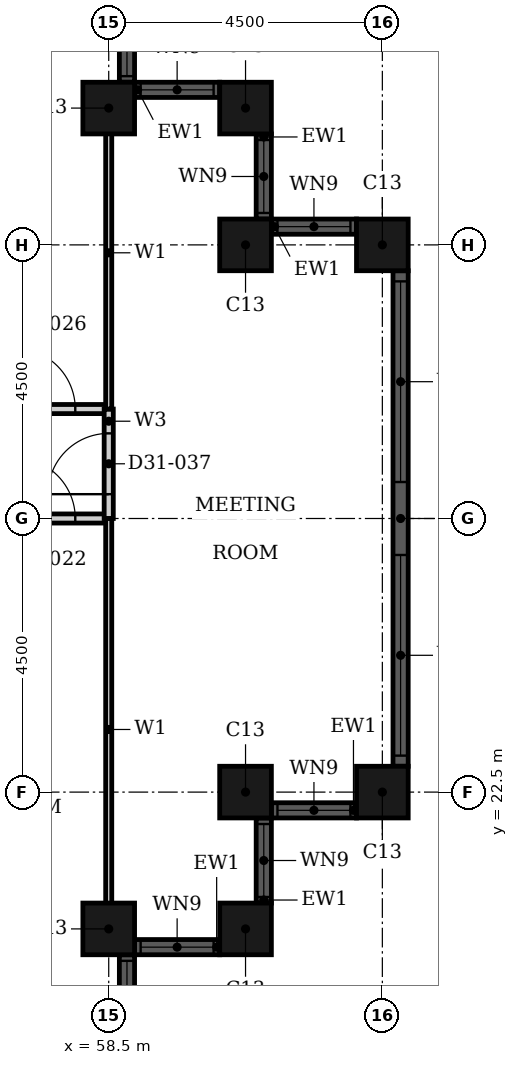
"""IFC4 building model, lengths in metres.
Left out: names, types, materials, properties, quantities, classifications, styles, units other than length and angle.
Written with IfcOpenShell. Run it as: python <this file> out.ifc"""

import sys

from ifc_helpers import new_model, si_unit, direction, frame, frame_2d, origin, origin_2d, place, context, subcontext, project, spatial, rectangle, hollow_rectangle, extrude, element, fill, save


model = new_model("IFC4")
c1 = context("Model", 3, precision=1e-05, world=origin(), true_north=direction((0.0, 1.0)))
c2 = subcontext(c1, "Body", "Model", "MODEL_VIEW")
j1 = project(units=[si_unit("LENGTHUNIT", "METRE"), si_unit("PLANEANGLEUNIT", "RADIAN")], contexts=[c1])
p1 = place(None, origin())
s1 = spatial("IfcSite", under=j1, at=p1, CompositionType="ELEMENT")
p2 = place(p1, origin())
s2 = spatial("IfcBuilding", under=s1, at=p2, CompositionType="ELEMENT")
p3 = place(p2, frame((0.0, 0.0, 126.0)))
s3 = spatial("IfcBuildingStorey", under=s2, at=p3, CompositionType="ELEMENT", Elevation=126.0)
for number, where, z_axis, x_axis in (
    (1, (58.5, 20.25, 0.0), (0.0, 0.0, 1.0), (1.0, 0.0, 0.0)),
    (2, (60.75, 20.25, 0.0), (0.0, 0.0, 1.0), (1.0, 0.0, 0.0)),
    (3, (60.75, 22.5, 0.0), (0.0, 0.0, 1.0), (1.0, 0.0, 0.0)),
    (4, (63.0, 22.5, 0.0), (0.0, 0.0, 1.0), (1.0, 0.0, 0.0)),
    (5, (63.0, 31.5, 0.0), (0.0, 0.0, 1.0), (1.0, 0.0, 0.0)),
    (6, (60.75, 31.5, 0.0), (0.0, 0.0, 1.0), (1.0, 0.0, 0.0)),
    (7, (60.75, 33.75, 0.0), (0.0, 0.0, 1.0), (1.0, 0.0, 0.0)),
    (8, (58.5, 33.75, 0.0), (0.0, 0.0, 1.0), (1.0, 0.0, 0.0)),
):
    element("IfcColumn", number, at=place(p3, frame(where, z_axis=z_axis, x_axis=x_axis)), inside=s3, PredefinedType="COLUMN", context=c2, shape_type="SweptSolid", body=[
        extrude(hollow_rectangle(XDim=0.85, YDim=0.85, WallThickness=0.026, at=origin_2d()), origin(), (0.0, 0.0, 1.0), 3.6),
    ])
p4 = place(p3, frame((58.8, 18.425, 0.0), z_axis=(0.0, 0.0, 1.0), x_axis=(0.0, 1.0, 0.0)))
e9 = element("IfcWall", 9, at=p4, inside=s3, PredefinedType="SOLIDWALL", context=c2, shape_type="SweptSolid", body=[
    extrude(rectangle(XDim=1.4, YDim=0.25, at=frame_2d((0.7, 0.0))), origin(), (0.0, 0.0, 1.0), 3.6),
])
p5 = place(p4, frame((0.1, 0.0, 0.9)))
e10 = element("IfcOpeningElement", 10, at=p5, cuts=e9, PredefinedType="OPENING", context=c2, shape_type="SweptSolid", body=[
    extrude(rectangle(XDim=1.2, YDim=2.08, at=frame_2d((0.6, 1.04))), frame((0.0, 0.135, 0.0), z_axis=(0.0, -1.0, 0.0), x_axis=(1.0, 0.0, 0.0)), (0.0, 0.0, 1.0), 0.27),
])
p6 = place(p3, frame((58.925, 19.95, 0.0), z_axis=(0.0, 0.0, 1.0), x_axis=(1.0, 0.0, 0.0)))
e11 = element("IfcWall", 11, at=p6, inside=s3, PredefinedType="SOLIDWALL", context=c2, shape_type="SweptSolid", body=[
    extrude(rectangle(XDim=1.4, YDim=0.25, at=frame_2d((0.7, 0.0))), origin(), (0.0, 0.0, 1.0), 3.6),
])
p7 = place(p6, frame((0.1, 0.0, 0.9)))
e12 = element("IfcOpeningElement", 12, at=p7, cuts=e11, PredefinedType="OPENING", context=c2, shape_type="SweptSolid", body=[
    extrude(rectangle(XDim=1.2, YDim=2.08, at=frame_2d((0.6, 1.04))), frame((0.0, 0.135, 0.0), z_axis=(0.0, -1.0, 0.0), x_axis=(1.0, 0.0, 0.0)), (0.0, 0.0, 1.0), 0.27),
])
p8 = place(p3, frame((61.05, 20.675, 0.0), z_axis=(0.0, 0.0, 1.0), x_axis=(0.0, 1.0, 0.0)))
e13 = element("IfcWall", 13, at=p8, inside=s3, PredefinedType="SOLIDWALL", context=c2, shape_type="SweptSolid", body=[
    extrude(rectangle(XDim=1.4, YDim=0.25, at=frame_2d((0.7, 0.0))), origin(), (0.0, 0.0, 1.0), 3.6),
])
p9 = place(p8, frame((0.1, 0.0, 0.9)))
e14 = element("IfcOpeningElement", 14, at=p9, cuts=e13, PredefinedType="OPENING", context=c2, shape_type="SweptSolid", body=[
    extrude(rectangle(XDim=1.2, YDim=2.08, at=frame_2d((0.6, 1.04))), frame((0.0, 0.135, 0.0), z_axis=(0.0, -1.0, 0.0), x_axis=(1.0, 0.0, 0.0)), (0.0, 0.0, 1.0), 0.27),
])
p10 = place(p3, frame((61.175, 22.2, 0.0), z_axis=(0.0, 0.0, 1.0), x_axis=(1.0, 0.0, 0.0)))
e15 = element("IfcWall", 15, at=p10, inside=s3, PredefinedType="SOLIDWALL", context=c2, shape_type="SweptSolid", body=[
    extrude(rectangle(XDim=1.4, YDim=0.25, at=frame_2d((0.7, 0.0))), origin(), (0.0, 0.0, 1.0), 3.6),
])
p11 = place(p10, frame((0.1, 0.0, 0.9)))
e16 = element("IfcOpeningElement", 16, at=p11, cuts=e15, PredefinedType="OPENING", context=c2, shape_type="SweptSolid", body=[
    extrude(rectangle(XDim=1.2, YDim=2.08, at=frame_2d((0.6, 1.04))), frame((0.0, 0.135, 0.0), z_axis=(0.0, -1.0, 0.0), x_axis=(1.0, 0.0, 0.0)), (0.0, 0.0, 1.0), 0.27),
])
p12 = place(p3, frame((63.3, 22.925, 0.0), z_axis=(0.0, 0.0, 1.0), x_axis=(0.0, 1.0, 0.0)))
e17 = element("IfcWall", 17, at=p12, inside=s3, PredefinedType="SOLIDWALL", context=c2, shape_type="SweptSolid", body=[
    extrude(rectangle(XDim=8.15, YDim=0.25, at=frame_2d((4.075, 0.0))), origin(), (0.0, 0.0, 1.0), 3.6),
])
p13 = place(p12, frame((0.175, 0.0, 0.9)))
e18 = element("IfcOpeningElement", 18, at=p13, cuts=e17, PredefinedType="OPENING", context=c2, shape_type="SweptSolid", body=[
    extrude(rectangle(XDim=3.3, YDim=2.08, at=frame_2d((1.65, 1.04))), frame((0.0, 0.135, 0.0), z_axis=(0.0, -1.0, 0.0), x_axis=(1.0, 0.0, 0.0)), (0.0, 0.0, 1.0), 0.27),
])
p14 = place(p12, frame((4.675, 0.0, 0.9)))
e19 = element("IfcOpeningElement", 19, at=p14, cuts=e17, PredefinedType="OPENING", context=c2, shape_type="SweptSolid", body=[
    extrude(rectangle(XDim=3.3, YDim=2.08, at=frame_2d((1.65, 1.04))), frame((0.0, 0.135, 0.0), z_axis=(0.0, -1.0, 0.0), x_axis=(1.0, 0.0, 0.0)), (0.0, 0.0, 1.0), 0.27),
])
p15 = place(p3, frame((62.575, 31.8, 0.0), z_axis=(0.0, 0.0, 1.0), x_axis=(-1.0, 0.0, 0.0)))
e20 = element("IfcWall", 20, at=p15, inside=s3, PredefinedType="SOLIDWALL", context=c2, shape_type="SweptSolid", body=[
    extrude(rectangle(XDim=1.4, YDim=0.25, at=frame_2d((0.7, 0.0))), origin(), (0.0, 0.0, 1.0), 3.6),
])
p16 = place(p15, frame((0.1, 0.0, 0.9)))
e21 = element("IfcOpeningElement", 21, at=p16, cuts=e20, PredefinedType="OPENING", context=c2, shape_type="SweptSolid", body=[
    extrude(rectangle(XDim=1.2, YDim=2.08, at=frame_2d((0.6, 1.04))), frame((0.0, 0.135, 0.0), z_axis=(0.0, -1.0, 0.0), x_axis=(1.0, 0.0, 0.0)), (0.0, 0.0, 1.0), 0.27),
])
p17 = place(p3, frame((61.05, 31.925, 0.0), z_axis=(0.0, 0.0, 1.0), x_axis=(0.0, 1.0, 0.0)))
e22 = element("IfcWall", 22, at=p17, inside=s3, PredefinedType="SOLIDWALL", context=c2, shape_type="SweptSolid", body=[
    extrude(rectangle(XDim=1.4, YDim=0.25, at=frame_2d((0.7, 0.0))), origin(), (0.0, 0.0, 1.0), 3.6),
])
p18 = place(p17, frame((0.1, 0.0, 0.9)))
e23 = element("IfcOpeningElement", 23, at=p18, cuts=e22, PredefinedType="OPENING", context=c2, shape_type="SweptSolid", body=[
    extrude(rectangle(XDim=1.2, YDim=2.08, at=frame_2d((0.6, 1.04))), frame((0.0, 0.135, 0.0), z_axis=(0.0, -1.0, 0.0), x_axis=(1.0, 0.0, 0.0)), (0.0, 0.0, 1.0), 0.27),
])
p19 = place(p3, frame((60.325, 34.05, 0.0), z_axis=(0.0, 0.0, 1.0), x_axis=(-1.0, 0.0, 0.0)))
e24 = element("IfcWall", 24, at=p19, inside=s3, PredefinedType="SOLIDWALL", context=c2, shape_type="SweptSolid", body=[
    extrude(rectangle(XDim=1.4, YDim=0.25, at=frame_2d((0.7, 0.0))), origin(), (0.0, 0.0, 1.0), 3.6),
])
p20 = place(p19, frame((0.1, 0.0, 0.9)))
e25 = element("IfcOpeningElement", 25, at=p20, cuts=e24, PredefinedType="OPENING", context=c2, shape_type="SweptSolid", body=[
    extrude(rectangle(XDim=1.2, YDim=2.08, at=frame_2d((0.6, 1.04))), frame((0.0, 0.135, 0.0), z_axis=(0.0, -1.0, 0.0), x_axis=(1.0, 0.0, 0.0)), (0.0, 0.0, 1.0), 0.27),
])
p21 = place(p3, frame((58.8, 34.175, 0.0), z_axis=(0.0, 0.0, 1.0), x_axis=(0.0, 1.0, 0.0)))
e26 = element("IfcWall", 26, at=p21, inside=s3, PredefinedType="SOLIDWALL", context=c2, shape_type="SweptSolid", body=[
    extrude(rectangle(XDim=1.4, YDim=0.25, at=frame_2d((0.7, 0.0))), origin(), (0.0, 0.0, 1.0), 3.6),
])
p22 = place(p21, frame((0.1, 0.0, 0.9)))
e27 = element("IfcOpeningElement", 27, at=p22, cuts=e26, PredefinedType="OPENING", context=c2, shape_type="SweptSolid", body=[
    extrude(rectangle(XDim=1.2, YDim=2.08, at=frame_2d((0.6, 1.04))), frame((0.0, 0.135, 0.0), z_axis=(0.0, -1.0, 0.0), x_axis=(1.0, 0.0, 0.0)), (0.0, 0.0, 1.0), 0.27),
])
p23 = place(p3, frame((46.8, 27.0, 0.0), z_axis=(0.0, 0.0, 1.0), x_axis=(1.0, 0.0, 0.0)))
e28 = element("IfcWall", 28, at=p23, inside=s3, PredefinedType="PARTITIONING", context=c2, shape_type="SweptSolid", body=[
    extrude(rectangle(XDim=11.7, YDim=0.15, at=frame_2d((5.85, 0.0))), origin(), (0.0, 0.0, 1.0), 2.58),
])
p24 = place(p23, frame((5.65, 0.0, 0.0)))
e29 = element("IfcOpeningElement", 29, at=p24, cuts=e28, PredefinedType="OPENING", context=c2, shape_type="SweptSolid", body=[
    extrude(rectangle(XDim=1.0, YDim=2.1, at=frame_2d((0.5, 1.05))), frame((0.0, 0.085, 0.0), z_axis=(0.0, -1.0, 0.0), x_axis=(1.0, 0.0, 0.0)), (0.0, 0.0, 1.0), 0.17),
])
p25 = place(p23, frame((10.15, 0.0, 0.0)))
e30 = element("IfcOpeningElement", 30, at=p25, cuts=e28, PredefinedType="OPENING", context=c2, shape_type="SweptSolid", body=[
    extrude(rectangle(XDim=1.0, YDim=2.1, at=frame_2d((0.5, 1.05))), frame((0.0, 0.085, 0.0), z_axis=(0.0, -1.0, 0.0), x_axis=(1.0, 0.0, 0.0)), (0.0, 0.0, 1.0), 0.17),
])
p26 = place(p3, frame((46.8, 28.8, 0.0), z_axis=(0.0, 0.0, 1.0), x_axis=(1.0, 0.0, 0.0)))
e31 = element("IfcWall", 31, at=p26, inside=s3, PredefinedType="PARTITIONING", context=c2, shape_type="SweptSolid", body=[
    extrude(rectangle(XDim=11.7, YDim=0.15, at=frame_2d((5.85, 0.0))), origin(), (0.0, 0.0, 1.0), 3.3),
])
p27 = place(p26, frame((5.65, 0.0, 0.0)))
e32 = element("IfcOpeningElement", 32, at=p27, cuts=e31, PredefinedType="OPENING", context=c2, shape_type="SweptSolid", body=[
    extrude(rectangle(XDim=1.0, YDim=2.1, at=frame_2d((0.5, 1.05))), frame((0.0, 0.085, 0.0), z_axis=(0.0, -1.0, 0.0), x_axis=(1.0, 0.0, 0.0)), (0.0, 0.0, 1.0), 0.17),
])
p28 = place(p26, frame((10.15, 0.0, 0.0)))
e33 = element("IfcOpeningElement", 33, at=p28, cuts=e31, PredefinedType="OPENING", context=c2, shape_type="SweptSolid", body=[
    extrude(rectangle(XDim=1.0, YDim=2.1, at=frame_2d((0.5, 1.05))), frame((0.0, 0.085, 0.0), z_axis=(0.0, -1.0, 0.0), x_axis=(1.0, 0.0, 0.0)), (0.0, 0.0, 1.0), 0.17),
])
p29 = place(p3, frame((58.5, 27.0, 0.0), z_axis=(0.0, 0.0, 1.0), x_axis=(0.0, 1.0, 0.0)))
e34 = element("IfcWall", 34, at=p29, inside=s3, PredefinedType="PARTITIONING", context=c2, shape_type="SweptSolid", body=[
    extrude(rectangle(XDim=1.8, YDim=0.15, at=frame_2d((0.9, 0.0))), origin(), (0.0, 0.0, 1.0), 3.3),
])
p30 = place(p29, frame((0.4, 0.0, 0.0)))
e35 = element("IfcOpeningElement", 35, at=p30, cuts=e34, PredefinedType="OPENING", context=c2, shape_type="SweptSolid", body=[
    extrude(rectangle(XDim=1.0, YDim=2.1, at=frame_2d((0.5, 1.05))), frame((0.0, 0.085, 0.0), z_axis=(0.0, -1.0, 0.0), x_axis=(1.0, 0.0, 0.0)), (0.0, 0.0, 1.0), 0.17),
])
p31 = place(p3, frame((58.5, 28.8, 0.0), z_axis=(0.0, 0.0, 1.0), x_axis=(0.0, 1.0, 0.0)))
e36 = element("IfcWall", 36, at=p31, inside=s3, PredefinedType="PARTITIONING", context=c2, shape_type="SweptSolid", body=[
    extrude(rectangle(XDim=5.14, YDim=0.1, at=frame_2d((2.57, 0.0))), origin(), (0.0, 0.0, 1.0), 3.3),
])
p32 = place(p3, frame((58.5, 20.06, 0.0), z_axis=(0.0, 0.0, 1.0), x_axis=(0.0, 1.0, 0.0)))
e37 = element("IfcWall", 37, at=p32, inside=s3, PredefinedType="PARTITIONING", context=c2, shape_type="SweptSolid", body=[
    extrude(rectangle(XDim=6.94, YDim=0.1, at=frame_2d((3.47, 0.0))), origin(), (0.0, 0.0, 1.0), 3.3),
])
p33 = place(p5, origin())
e38 = element("IfcWindow", 38, at=p33, inside=s3, PartitioningType="SINGLE_PANEL", PredefinedType="WINDOW", context=c2, shape_type="SweptSolid", body=[
    extrude(rectangle(XDim=1.2, YDim=2.08, at=frame_2d((0.6, 1.04))), frame((0.0, 0.03, 0.0), z_axis=(0.0, -1.0, 0.0), x_axis=(1.0, 0.0, 0.0)), (0.0, 0.0, 1.0), 0.06),
])
fill(e10, e38)
p34 = place(p7, origin())
e39 = element("IfcWindow", 39, at=p34, inside=s3, PartitioningType="SINGLE_PANEL", PredefinedType="WINDOW", context=c2, shape_type="SweptSolid", body=[
    extrude(rectangle(XDim=1.2, YDim=2.08, at=frame_2d((0.6, 1.04))), frame((0.0, 0.03, 0.0), z_axis=(0.0, -1.0, 0.0), x_axis=(1.0, 0.0, 0.0)), (0.0, 0.0, 1.0), 0.06),
])
fill(e12, e39)
p35 = place(p9, origin())
e40 = element("IfcWindow", 40, at=p35, inside=s3, PartitioningType="SINGLE_PANEL", PredefinedType="WINDOW", context=c2, shape_type="SweptSolid", body=[
    extrude(rectangle(XDim=1.2, YDim=2.08, at=frame_2d((0.6, 1.04))), frame((0.0, 0.03, 0.0), z_axis=(0.0, -1.0, 0.0), x_axis=(1.0, 0.0, 0.0)), (0.0, 0.0, 1.0), 0.06),
])
fill(e14, e40)
p36 = place(p11, origin())
e41 = element("IfcWindow", 41, at=p36, inside=s3, PartitioningType="SINGLE_PANEL", PredefinedType="WINDOW", context=c2, shape_type="SweptSolid", body=[
    extrude(rectangle(XDim=1.2, YDim=2.08, at=frame_2d((0.6, 1.04))), frame((0.0, 0.03, 0.0), z_axis=(0.0, -1.0, 0.0), x_axis=(1.0, 0.0, 0.0)), (0.0, 0.0, 1.0), 0.06),
])
fill(e16, e41)
p37 = place(p13, origin())
e42 = element("IfcWindow", 42, at=p37, inside=s3, PartitioningType="SINGLE_PANEL", PredefinedType="WINDOW", context=c2, shape_type="SweptSolid", body=[
    extrude(rectangle(XDim=3.3, YDim=2.08, at=frame_2d((1.65, 1.04))), frame((0.0, 0.03, 0.0), z_axis=(0.0, -1.0, 0.0), x_axis=(1.0, 0.0, 0.0)), (0.0, 0.0, 1.0), 0.06),
])
fill(e18, e42)
p38 = place(p14, origin())
e43 = element("IfcWindow", 43, at=p38, inside=s3, PartitioningType="SINGLE_PANEL", PredefinedType="WINDOW", context=c2, shape_type="SweptSolid", body=[
    extrude(rectangle(XDim=3.3, YDim=2.08, at=frame_2d((1.65, 1.04))), frame((0.0, 0.03, 0.0), z_axis=(0.0, -1.0, 0.0), x_axis=(1.0, 0.0, 0.0)), (0.0, 0.0, 1.0), 0.06),
])
fill(e19, e43)
p39 = place(p16, origin())
e44 = element("IfcWindow", 44, at=p39, inside=s3, PartitioningType="SINGLE_PANEL", PredefinedType="WINDOW", context=c2, shape_type="SweptSolid", body=[
    extrude(rectangle(XDim=1.2, YDim=2.08, at=frame_2d((0.6, 1.04))), frame((0.0, 0.03, 0.0), z_axis=(0.0, -1.0, 0.0), x_axis=(1.0, 0.0, 0.0)), (0.0, 0.0, 1.0), 0.06),
])
fill(e21, e44)
p40 = place(p18, origin())
e45 = element("IfcWindow", 45, at=p40, inside=s3, PartitioningType="SINGLE_PANEL", PredefinedType="WINDOW", context=c2, shape_type="SweptSolid", body=[
    extrude(rectangle(XDim=1.2, YDim=2.08, at=frame_2d((0.6, 1.04))), frame((0.0, 0.03, 0.0), z_axis=(0.0, -1.0, 0.0), x_axis=(1.0, 0.0, 0.0)), (0.0, 0.0, 1.0), 0.06),
])
fill(e23, e45)
p41 = place(p20, origin())
e46 = element("IfcWindow", 46, at=p41, inside=s3, PartitioningType="SINGLE_PANEL", PredefinedType="WINDOW", context=c2, shape_type="SweptSolid", body=[
    extrude(rectangle(XDim=1.2, YDim=2.08, at=frame_2d((0.6, 1.04))), frame((0.0, 0.03, 0.0), z_axis=(0.0, -1.0, 0.0), x_axis=(1.0, 0.0, 0.0)), (0.0, 0.0, 1.0), 0.06),
])
fill(e25, e46)
p42 = place(p22, origin())
e47 = element("IfcWindow", 47, at=p42, inside=s3, PartitioningType="SINGLE_PANEL", PredefinedType="WINDOW", context=c2, shape_type="SweptSolid", body=[
    extrude(rectangle(XDim=1.2, YDim=2.08, at=frame_2d((0.6, 1.04))), frame((0.0, 0.03, 0.0), z_axis=(0.0, -1.0, 0.0), x_axis=(1.0, 0.0, 0.0)), (0.0, 0.0, 1.0), 0.06),
])
fill(e27, e47)
p43 = place(p25, origin())
e48 = element("IfcDoor", 48, at=p43, inside=s3, OperationType="SINGLE_SWING_RIGHT", PredefinedType="DOOR", context=c2, shape_type="SweptSolid", body=[
    extrude(rectangle(XDim=1.0, YDim=2.1, at=frame_2d((0.5, 1.05))), frame((0.0, 0.025, 0.0), z_axis=(0.0, -1.0, 0.0), x_axis=(1.0, 0.0, 0.0)), (0.0, 0.0, 1.0), 0.05),
])
fill(e30, e48)
p44 = place(p28, origin())
e49 = element("IfcDoor", 49, at=p44, inside=s3, OperationType="SINGLE_SWING_RIGHT", PredefinedType="DOOR", context=c2, shape_type="SweptSolid", body=[
    extrude(rectangle(XDim=1.0, YDim=2.1, at=frame_2d((0.5, 1.05))), frame((0.0, 0.025, 0.0), z_axis=(0.0, -1.0, 0.0), x_axis=(1.0, 0.0, 0.0)), (0.0, 0.0, 1.0), 0.05),
])
fill(e33, e49)
p45 = place(p30, origin())
e50 = element("IfcDoor", 50, at=p45, inside=s3, OperationType="SINGLE_SWING_RIGHT", PredefinedType="DOOR", context=c2, shape_type="SweptSolid", body=[
    extrude(rectangle(XDim=1.0, YDim=2.1, at=frame_2d((0.5, 1.05))), frame((0.0, 0.025, 0.0), z_axis=(0.0, -1.0, 0.0), x_axis=(1.0, 0.0, 0.0)), (0.0, 0.0, 1.0), 0.05),
])
fill(e35, e50)
save(model, sys.argv[1])
